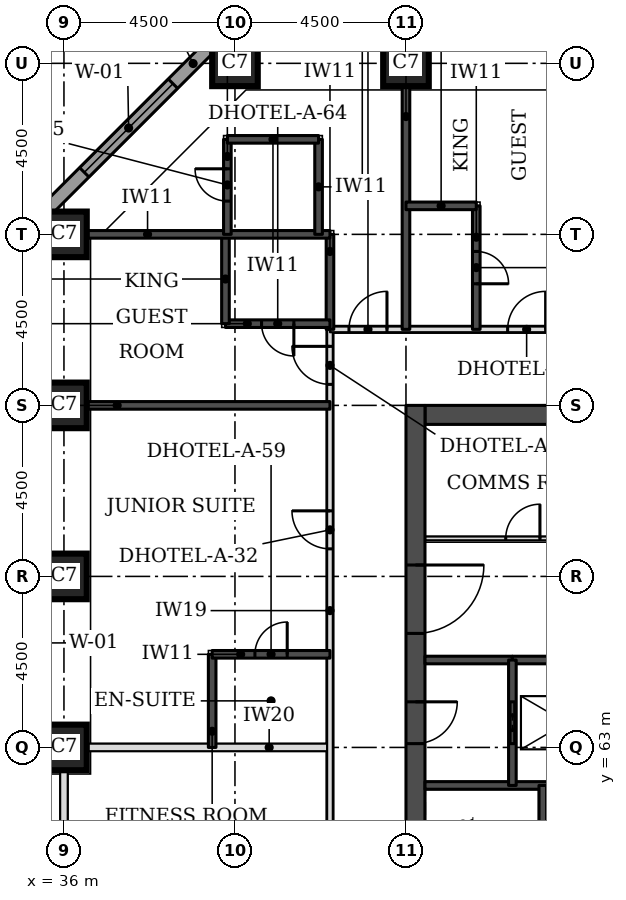
"""IFC4 building model, lengths in metres.
Left out: names, types, materials, properties, quantities, classifications, styles, units other than length and angle.
Written with IfcOpenShell. Run it as: python <this file> out.ifc"""

import sys

from ifc_helpers import new_model, si_unit, direction, frame, frame_2d, origin, origin_2d, place, context, subcontext, project, spatial, rectangle, extrude, element, fill, save


model = new_model("IFC4")
c1 = context("Model", 3, precision=1e-05, world=origin(), true_north=direction((0.0, 1.0)))
c2 = subcontext(c1, "Body", "Model", "MODEL_VIEW")
j1 = project(units=[si_unit("LENGTHUNIT", "METRE"), si_unit("PLANEANGLEUNIT", "RADIAN")], contexts=[c1])
p1 = place(None, origin())
s1 = spatial("IfcSite", under=j1, at=p1, CompositionType="ELEMENT")
p2 = place(p1, origin())
s2 = spatial("IfcBuilding", under=s1, at=p2, CompositionType="ELEMENT")
p3 = place(p2, frame((0.0, 0.0, 26.4)))
s3 = spatial("IfcBuildingStorey", under=s2, at=p3, CompositionType="ELEMENT", Elevation=26.4)
for number, where, z_axis, x_axis in (
    (1, (36.0, 63.0, 0.0), (0.0, 0.0, 1.0), (1.0, 0.0, 0.0)),
    (2, (36.0, 67.5, 0.0), (0.0, 0.0, 1.0), (1.0, 0.0, 0.0)),
    (3, (36.0, 72.0, 0.0), (0.0, 0.0, 1.0), (1.0, 0.0, 0.0)),
    (4, (36.0, 76.5, 0.0), (0.0, 0.0, 1.0), (1.0, 0.0, 0.0)),
    (5, (40.5, 81.0, 0.0), (0.0, 0.0, 1.0), (1.0, 0.0, 0.0)),
    (6, (45.0, 81.0, 0.0), (0.0, 0.0, 1.0), (1.0, 0.0, 0.0)),
):
    element("IfcColumn", number, at=place(p3, frame(where, z_axis=z_axis, x_axis=x_axis)), inside=s3, PredefinedType="COLUMN", context=c2, shape_type="SweptSolid", body=[
        extrude(rectangle(XDim=1.2, YDim=1.2, at=origin_2d()), origin(), (0.0, 0.0, 1.0), 3.3),
    ])
p4 = place(p3, frame((45.5, 71.75, 0.0), z_axis=(0.0, 0.0, 1.0), x_axis=(1.0, 0.0, 0.0)))
e7 = element("IfcWall", 7, at=p4, inside=s3, PredefinedType="SHEAR", context=c2, shape_type="SweptSolid", body=[
    extrude(rectangle(XDim=21.5, YDim=0.5, at=frame_2d((10.75, 0.0))), origin(), (0.0, 0.0, 1.0), 3.3),
])
p5 = place(p3, frame((45.25, 49.5, 0.0), z_axis=(0.0, 0.0, 1.0), x_axis=(0.0, 1.0, 0.0)))
e8 = element("IfcWall", 8, at=p5, inside=s3, PredefinedType="SHEAR", context=c2, shape_type="SweptSolid", body=[
    extrude(rectangle(XDim=22.5, YDim=0.5, at=frame_2d((11.25, 0.0))), origin(), (0.0, 0.0, 1.0), 3.3),
])
p6 = place(p5, frame((4.2, 0.0, 0.0)))
e9 = element("IfcOpeningElement", 9, at=p6, cuts=e8, PredefinedType="OPENING", context=c2, shape_type="SweptSolid", body=[
    extrude(rectangle(XDim=1.8, YDim=2.1, at=frame_2d((0.9, 1.05))), frame((0.0, 0.26, 0.0), z_axis=(0.0, -1.0, 0.0), x_axis=(1.0, 0.0, 0.0)), (0.0, 0.0, 1.0), 0.52),
])
p7 = place(p5, frame((6.9, 0.0, 0.0)))
e10 = element("IfcOpeningElement", 10, at=p7, cuts=e8, PredefinedType="OPENING", context=c2, shape_type="SweptSolid", body=[
    extrude(rectangle(XDim=1.1, YDim=2.1, at=frame_2d((0.55, 1.05))), frame((0.0, 0.26, 0.0), z_axis=(0.0, -1.0, 0.0), x_axis=(1.0, 0.0, 0.0)), (0.0, 0.0, 1.0), 0.52),
])
p8 = place(p5, frame((13.6, 0.0, 0.0)))
e11 = element("IfcOpeningElement", 11, at=p8, cuts=e8, PredefinedType="OPENING", context=c2, shape_type="SweptSolid", body=[
    extrude(rectangle(XDim=1.1, YDim=2.1, at=frame_2d((0.55, 1.05))), frame((0.0, 0.26, 0.0), z_axis=(0.0, -1.0, 0.0), x_axis=(1.0, 0.0, 0.0)), (0.0, 0.0, 1.0), 0.52),
])
p9 = place(p5, frame((16.5, 0.0, 0.0)))
e12 = element("IfcOpeningElement", 12, at=p9, cuts=e8, PredefinedType="OPENING", context=c2, shape_type="SweptSolid", body=[
    extrude(rectangle(XDim=1.8, YDim=2.1, at=frame_2d((0.9, 1.05))), frame((0.0, 0.26, 0.0), z_axis=(0.0, -1.0, 0.0), x_axis=(1.0, 0.0, 0.0)), (0.0, 0.0, 1.0), 0.52),
])
p10 = place(p3, frame((40.23, 81.826, 0.0), z_axis=(0.0, 0.0, 1.0), x_axis=(-0.707106781187, -0.707106781187, 0.0)))
e13 = element("IfcWall", 13, at=p10, inside=s3, PredefinedType="STANDARD", context=c2, shape_type="SweptSolid", body=[
    extrude(rectangle(XDim=7.151, YDim=0.35, at=frame_2d((3.576, 0.0))), origin(), (0.0, 0.0, 1.0), 3.055),
])
p11 = place(p10, frame((1.926, 0.0, 0.8)))
e14 = element("IfcOpeningElement", 14, at=p11, cuts=e13, PredefinedType="OPENING", context=c2, shape_type="SweptSolid", body=[
    extrude(rectangle(XDim=3.3, YDim=1.5, at=frame_2d((1.65, 0.75))), frame((0.0, 0.185, 0.0), z_axis=(0.0, -1.0, 0.0), x_axis=(1.0, 0.0, 0.0)), (0.0, 0.0, 1.0), 0.37),
])
p12 = place(p3, frame((36.0, 56.0, 0.0), z_axis=(0.0, 0.0, 1.0), x_axis=(0.0, 1.0, 0.0)))
e15 = element("IfcWall", 15, at=p12, inside=s3, PredefinedType="PARTITIONING", context=c2, shape_type="SweptSolid", body=[
    extrude(rectangle(XDim=6.4, YDim=0.2, at=frame_2d((3.2, 0.0))), origin(), (0.0, 0.0, 1.0), 2.33),
])
p13 = place(p3, frame((36.6, 63.0, 0.0), z_axis=(0.0, 0.0, 1.0), x_axis=(1.0, 0.0, 0.0)))
e16 = element("IfcWall", 16, at=p13, inside=s3, PredefinedType="PARTITIONING", context=c2, shape_type="SweptSolid", body=[
    extrude(rectangle(XDim=6.4, YDim=0.2, at=frame_2d((3.2, 0.0))), origin(), (0.0, 0.0, 1.0), 3.08),
])
p14 = place(p3, frame((43.0, 56.0, 0.0), z_axis=(0.0, 0.0, 1.0), x_axis=(0.0, 1.0, 0.0)))
e17 = element("IfcWall", 17, at=p14, inside=s3, PredefinedType="PARTITIONING", context=c2, shape_type="SweptSolid", body=[
    extrude(rectangle(XDim=18.0, YDim=0.15, at=frame_2d((9.0, 0.0))), origin(), (0.0, 0.0, 1.0), 3.08),
])
p15 = place(p14, frame((12.225, 0.0, 0.0)))
e18 = element("IfcOpeningElement", 18, at=p15, cuts=e17, PredefinedType="OPENING", context=c2, shape_type="SweptSolid", body=[
    extrude(rectangle(XDim=1.0, YDim=2.1, at=frame_2d((0.5, 1.05))), frame((0.0, 0.085, 0.0), z_axis=(0.0, -1.0, 0.0), x_axis=(1.0, 0.0, 0.0)), (0.0, 0.0, 1.0), 0.17),
])
p16 = place(p14, frame((16.553, 0.0, 0.0)))
e19 = element("IfcOpeningElement", 19, at=p16, cuts=e17, PredefinedType="OPENING", context=c2, shape_type="SweptSolid", body=[
    extrude(rectangle(XDim=1.0, YDim=2.1, at=frame_2d((0.5, 1.05))), frame((0.0, 0.085, 0.0), z_axis=(0.0, -1.0, 0.0), x_axis=(1.0, 0.0, 0.0)), (0.0, 0.0, 1.0), 0.17),
])
p17 = place(p14, frame((3.05, 0.0, 0.0)))
e20 = element("IfcOpeningElement", 20, at=p17, cuts=e17, PredefinedType="OPENING", context=c2, shape_type="SweptSolid", body=[
    extrude(rectangle(XDim=0.9, YDim=2.1, at=frame_2d((0.45, 1.05))), frame((0.0, 0.085, 0.0), z_axis=(0.0, -1.0, 0.0), x_axis=(1.0, 0.0, 0.0)), (0.0, 0.0, 1.0), 0.17),
])
p18 = place(p3, frame((43.0, 74.0, 0.0), z_axis=(0.0, 0.0, 1.0), x_axis=(1.0, 0.0, 0.0)))
e21 = element("IfcWall", 21, at=p18, inside=s3, PredefinedType="PARTITIONING", context=c2, shape_type="SweptSolid", body=[
    extrude(rectangle(XDim=26.5, YDim=0.15, at=frame_2d((13.25, 0.0))), origin(), (0.0, 0.0, 1.0), 3.08),
])
p19 = place(p18, frame((4.675, 0.0, 0.0)))
e22 = element("IfcOpeningElement", 22, at=p19, cuts=e21, PredefinedType="OPENING", context=c2, shape_type="SweptSolid", body=[
    extrude(rectangle(XDim=1.0, YDim=2.1, at=frame_2d((0.5, 1.05))), frame((0.0, 0.085, 0.0), z_axis=(0.0, -1.0, 0.0), x_axis=(1.0, 0.0, 0.0)), (0.0, 0.0, 1.0), 0.17),
])
p20 = place(p18, frame((9.025, 0.0, 0.0)))
e23 = element("IfcOpeningElement", 23, at=p20, cuts=e21, PredefinedType="OPENING", context=c2, shape_type="SweptSolid", body=[
    extrude(rectangle(XDim=1.0, YDim=2.1, at=frame_2d((0.5, 1.05))), frame((0.0, 0.085, 0.0), z_axis=(0.0, -1.0, 0.0), x_axis=(1.0, 0.0, 0.0)), (0.0, 0.0, 1.0), 0.17),
])
p21 = place(p18, frame((20.725, 0.0, 0.0)))
e24 = element("IfcOpeningElement", 24, at=p21, cuts=e21, PredefinedType="OPENING", context=c2, shape_type="SweptSolid", body=[
    extrude(rectangle(XDim=1.0, YDim=2.1, at=frame_2d((0.5, 1.05))), frame((0.0, 0.085, 0.0), z_axis=(0.0, -1.0, 0.0), x_axis=(1.0, 0.0, 0.0)), (0.0, 0.0, 1.0), 0.17),
])
p22 = place(p18, frame((0.5, 0.0, 0.0)))
e25 = element("IfcOpeningElement", 25, at=p22, cuts=e21, PredefinedType="OPENING", context=c2, shape_type="SweptSolid", body=[
    extrude(rectangle(XDim=1.0, YDim=2.1, at=frame_2d((0.5, 1.05))), frame((0.0, 0.085, 0.0), z_axis=(0.0, -1.0, 0.0), x_axis=(1.0, 0.0, 0.0)), (0.0, 0.0, 1.0), 0.17),
])
p23 = place(p18, frame((25.0, 0.0, 0.0)))
e26 = element("IfcOpeningElement", 26, at=p23, cuts=e21, PredefinedType="OPENING", context=c2, shape_type="SweptSolid", body=[
    extrude(rectangle(XDim=1.0, YDim=2.1, at=frame_2d((0.5, 1.05))), frame((0.0, 0.085, 0.0), z_axis=(0.0, -1.0, 0.0), x_axis=(1.0, 0.0, 0.0)), (0.0, 0.0, 1.0), 0.17),
])
p24 = place(p3, frame((39.9, 63.0, 0.0), z_axis=(0.0, 0.0, 1.0), x_axis=(0.0, 1.0, 0.0)))
e27 = element("IfcWall", 27, at=p24, inside=s3, PredefinedType="SOLIDWALL", context=c2, shape_type="SweptSolid", body=[
    extrude(rectangle(XDim=2.45, YDim=0.2, at=frame_2d((1.225, 0.0))), origin(), (0.0, 0.0, 1.0), 3.08),
])
p25 = place(p3, frame((39.9, 65.45, 0.0), z_axis=(0.0, 0.0, 1.0), x_axis=(1.0, 0.0, 0.0)))
e28 = element("IfcWall", 28, at=p25, inside=s3, PredefinedType="SOLIDWALL", context=c2, shape_type="SweptSolid", body=[
    extrude(rectangle(XDim=3.1, YDim=0.2, at=frame_2d((1.55, 0.0))), origin(), (0.0, 0.0, 1.0), 3.08),
])
p26 = place(p25, frame((1.125, 0.0, 0.0)))
e29 = element("IfcOpeningElement", 29, at=p26, cuts=e28, PredefinedType="OPENING", context=c2, shape_type="SweptSolid", body=[
    extrude(rectangle(XDim=0.85, YDim=2.1, at=frame_2d((0.425, 1.05))), frame((0.0, 0.11, 0.0), z_axis=(0.0, -1.0, 0.0), x_axis=(1.0, 0.0, 0.0)), (0.0, 0.0, 1.0), 0.22),
])
p27 = place(p3, frame((36.6, 72.0, 0.0), z_axis=(0.0, 0.0, 1.0), x_axis=(1.0, 0.0, 0.0)))
e30 = element("IfcWall", 30, at=p27, inside=s3, PredefinedType="SOLIDWALL", context=c2, shape_type="SweptSolid", body=[
    extrude(rectangle(XDim=6.4, YDim=0.2, at=frame_2d((3.2, 0.0))), origin(), (0.0, 0.0, 1.0), 3.08),
])
p28 = place(p3, frame((43.0, 74.0, 0.0), z_axis=(0.0, 0.0, 1.0), x_axis=(0.0, 1.0, 0.0)))
e31 = element("IfcWall", 31, at=p28, inside=s3, PredefinedType="SOLIDWALL", context=c2, shape_type="SweptSolid", body=[
    extrude(rectangle(XDim=2.5, YDim=0.2, at=frame_2d((1.25, 0.0))), origin(), (0.0, 0.0, 1.0), 3.08),
])
p29 = place(p3, frame((45.0, 74.0, 0.0), z_axis=(0.0, 0.0, 1.0), x_axis=(0.0, 1.0, 0.0)))
e32 = element("IfcWall", 32, at=p29, inside=s3, PredefinedType="SOLIDWALL", context=c2, shape_type="SweptSolid", body=[
    extrude(rectangle(XDim=6.4, YDim=0.2, at=frame_2d((3.2, 0.0))), origin(), (0.0, 0.0, 1.0), 3.08),
])
p30 = place(p3, frame((46.85, 74.0, 0.0), z_axis=(0.0, 0.0, 1.0), x_axis=(0.0, 1.0, 0.0)))
e33 = element("IfcWall", 33, at=p30, inside=s3, PredefinedType="SOLIDWALL", context=c2, shape_type="SweptSolid", body=[
    extrude(rectangle(XDim=3.25, YDim=0.2, at=frame_2d((1.625, 0.0))), origin(), (0.0, 0.0, 1.0), 3.08),
])
p31 = place(p30, frame((1.2, 0.0, 0.0)))
e34 = element("IfcOpeningElement", 34, at=p31, cuts=e33, PredefinedType="OPENING", context=c2, shape_type="SweptSolid", body=[
    extrude(rectangle(XDim=0.85, YDim=2.1, at=frame_2d((0.425, 1.05))), frame((0.0, 0.11, 0.0), z_axis=(0.0, -1.0, 0.0), x_axis=(1.0, 0.0, 0.0)), (0.0, 0.0, 1.0), 0.22),
])
p32 = place(p3, frame((40.25, 74.15, 0.0), z_axis=(0.0, 0.0, 1.0), x_axis=(1.0, 0.0, 0.0)))
e35 = element("IfcWall", 35, at=p32, inside=s3, PredefinedType="SOLIDWALL", context=c2, shape_type="SweptSolid", body=[
    extrude(rectangle(XDim=2.75, YDim=0.2, at=frame_2d((1.375, 0.0))), origin(), (0.0, 0.0, 1.0), 3.08),
])
p33 = place(p32, frame((0.95, 0.0, 0.0)))
e36 = element("IfcOpeningElement", 36, at=p33, cuts=e35, PredefinedType="OPENING", context=c2, shape_type="SweptSolid", body=[
    extrude(rectangle(XDim=0.85, YDim=2.1, at=frame_2d((0.425, 1.05))), frame((0.0, 0.11, 0.0), z_axis=(0.0, -1.0, 0.0), x_axis=(1.0, 0.0, 0.0)), (0.0, 0.0, 1.0), 0.22),
])
p34 = place(p3, frame((40.25, 74.15, 0.0), z_axis=(0.0, 0.0, 1.0), x_axis=(0.0, 1.0, 0.0)))
e37 = element("IfcWall", 37, at=p34, inside=s3, PredefinedType="SOLIDWALL", context=c2, shape_type="SweptSolid", body=[
    extrude(rectangle(XDim=2.35, YDim=0.2, at=frame_2d((1.175, 0.0))), origin(), (0.0, 0.0, 1.0), 3.08),
])
p35 = place(p3, frame((36.6, 76.5, 0.0), z_axis=(0.0, 0.0, 1.0), x_axis=(1.0, 0.0, 0.0)))
e38 = element("IfcWall", 38, at=p35, inside=s3, PredefinedType="SOLIDWALL", context=c2, shape_type="SweptSolid", body=[
    extrude(rectangle(XDim=6.4, YDim=0.2, at=frame_2d((3.2, 0.0))), origin(), (0.0, 0.0, 1.0), 3.08),
])
p36 = place(p3, frame((40.3, 76.5, 0.0), z_axis=(0.0, 0.0, 1.0), x_axis=(0.0, 1.0, 0.0)))
e39 = element("IfcWall", 39, at=p36, inside=s3, PredefinedType="SOLIDWALL", context=c2, shape_type="SweptSolid", body=[
    extrude(rectangle(XDim=2.5, YDim=0.2, at=frame_2d((1.25, 0.0))), origin(), (0.0, 0.0, 1.0), 3.08),
])
p37 = place(p36, frame((0.875, 0.0, 0.0)))
e40 = element("IfcOpeningElement", 40, at=p37, cuts=e39, PredefinedType="OPENING", context=c2, shape_type="SweptSolid", body=[
    extrude(rectangle(XDim=0.85, YDim=2.1, at=frame_2d((0.425, 1.05))), frame((0.0, 0.11, 0.0), z_axis=(0.0, -1.0, 0.0), x_axis=(1.0, 0.0, 0.0)), (0.0, 0.0, 1.0), 0.22),
])
p38 = place(p3, frame((42.7, 76.5, 0.0), z_axis=(0.0, 0.0, 1.0), x_axis=(0.0, 1.0, 0.0)))
e41 = element("IfcWall", 41, at=p38, inside=s3, PredefinedType="SOLIDWALL", context=c2, shape_type="SweptSolid", body=[
    extrude(rectangle(XDim=2.5, YDim=0.2, at=frame_2d((1.25, 0.0))), origin(), (0.0, 0.0, 1.0), 3.08),
])
p39 = place(p3, frame((45.0, 77.25, 0.0), z_axis=(0.0, 0.0, 1.0), x_axis=(1.0, 0.0, 0.0)))
e42 = element("IfcWall", 42, at=p39, inside=s3, PredefinedType="SOLIDWALL", context=c2, shape_type="SweptSolid", body=[
    extrude(rectangle(XDim=1.85, YDim=0.2, at=frame_2d((0.925, 0.0))), origin(), (0.0, 0.0, 1.0), 3.08),
])
p40 = place(p3, frame((40.3, 79.0, 0.0), z_axis=(0.0, 0.0, 1.0), x_axis=(1.0, 0.0, 0.0)))
e43 = element("IfcWall", 43, at=p40, inside=s3, PredefinedType="SOLIDWALL", context=c2, shape_type="SweptSolid", body=[
    extrude(rectangle(XDim=2.4, YDim=0.2, at=frame_2d((1.2, 0.0))), origin(), (0.0, 0.0, 1.0), 3.08),
])
p41 = place(p3, frame((45.5, 62.0, 0.0), z_axis=(0.0, 0.0, 1.0), x_axis=(1.0, 0.0, 0.0)))
e44 = element("IfcWall", 44, at=p41, inside=s3, PredefinedType="SOLIDWALL", context=c2, shape_type="SweptSolid", body=[
    extrude(rectangle(XDim=5.15, YDim=0.2, at=frame_2d((2.575, 0.0))), origin(), (0.0, 0.0, 1.0), 3.08),
])
p42 = place(p3, frame((45.5, 65.3, 0.0), z_axis=(0.0, 0.0, 1.0), x_axis=(1.0, 0.0, 0.0)))
e45 = element("IfcWall", 45, at=p42, inside=s3, PredefinedType="SOLIDWALL", context=c2, shape_type="SweptSolid", body=[
    extrude(rectangle(XDim=2.3, YDim=0.2, at=frame_2d((1.15, 0.0))), origin(), (0.0, 0.0, 1.0), 3.08),
])
p43 = place(p3, frame((47.8, 65.3, 0.0), z_axis=(0.0, 0.0, 1.0), x_axis=(1.0, 0.0, 0.0)))
e46 = element("IfcWall", 46, at=p43, inside=s3, PredefinedType="SOLIDWALL", context=c2, shape_type="SweptSolid", body=[
    extrude(rectangle(XDim=16.9, YDim=0.2, at=frame_2d((8.45, 0.0))), origin(), (0.0, 0.0, 1.0), 3.08),
])
p44 = place(p3, frame((45.5, 68.5, 0.0), z_axis=(0.0, 0.0, 1.0), x_axis=(1.0, 0.0, 0.0)))
e47 = element("IfcWall", 47, at=p44, inside=s3, PredefinedType="PARTITIONING", context=c2, shape_type="SweptSolid", body=[
    extrude(rectangle(XDim=5.15, YDim=0.1, at=frame_2d((2.575, 0.0))), origin(), (0.0, 0.0, 1.0), 3.08),
])
p45 = place(p44, frame((2.125, 0.0, 0.0)))
e48 = element("IfcOpeningElement", 48, at=p45, cuts=e47, PredefinedType="OPENING", context=c2, shape_type="SweptSolid", body=[
    extrude(rectangle(XDim=0.9, YDim=2.1, at=frame_2d((0.45, 1.05))), frame((0.0, 0.06, 0.0), z_axis=(0.0, -1.0, 0.0), x_axis=(1.0, 0.0, 0.0)), (0.0, 0.0, 1.0), 0.12),
])
p46 = place(p3, frame((47.8, 62.0, 0.0), z_axis=(0.0, 0.0, 1.0), x_axis=(0.0, 1.0, 0.0)))
e49 = element("IfcWall", 49, at=p46, inside=s3, PredefinedType="SOLIDWALL", context=c2, shape_type="SweptSolid", body=[
    extrude(rectangle(XDim=3.3, YDim=0.2, at=frame_2d((1.65, 0.0))), origin(), (0.0, 0.0, 1.0), 3.08),
])
p47 = place(p46, frame((1.1, 0.0, 0.0)))
e50 = element("IfcOpeningElement", 50, at=p47, cuts=e49, PredefinedType="OPENING", context=c2, shape_type="SweptSolid", body=[
    extrude(rectangle(XDim=1.1, YDim=2.1, at=frame_2d((0.55, 1.05))), frame((0.0, 0.11, 0.0), z_axis=(0.0, -1.0, 0.0), x_axis=(1.0, 0.0, 0.0)), (0.0, 0.0, 1.0), 0.22),
])
p48 = place(p3, frame((48.6, 56.2, 0.0), z_axis=(0.0, 0.0, 1.0), x_axis=(0.0, 1.0, 0.0)))
e51 = element("IfcWall", 51, at=p48, inside=s3, PredefinedType="SOLIDWALL", context=c2, shape_type="SweptSolid", body=[
    extrude(rectangle(XDim=5.8, YDim=0.2, at=frame_2d((2.9, 0.0))), origin(), (0.0, 0.0, 1.0), 3.08),
])
p49 = place(p11, origin())
e52 = element("IfcWindow", 52, at=p49, inside=s3, PartitioningType="SINGLE_PANEL", PredefinedType="WINDOW", context=c2, shape_type="SweptSolid", body=[
    extrude(rectangle(XDim=3.3, YDim=1.5, at=frame_2d((1.65, 0.75))), frame((0.0, 0.085, 0.0), z_axis=(0.0, -1.0, 0.0), x_axis=(1.0, 0.0, 0.0)), (0.0, 0.0, 1.0), 0.06),
])
fill(e14, e52)
p50 = place(p15, origin())
e53 = element("IfcDoor", 53, at=p50, inside=s3, OperationType="SINGLE_SWING_RIGHT", PredefinedType="DOOR", context=c2, shape_type="SweptSolid", body=[
    extrude(rectangle(XDim=1.0, YDim=2.1, at=frame_2d((0.5, 1.05))), frame((0.0, 0.025, 0.0), z_axis=(0.0, -1.0, 0.0), x_axis=(1.0, 0.0, 0.0)), (0.0, 0.0, 1.0), 0.05),
])
fill(e18, e53)
p51 = place(p26, origin())
e54 = element("IfcDoor", 54, at=p51, inside=s3, OperationType="SINGLE_SWING_RIGHT", PredefinedType="DOOR", context=c2, shape_type="SweptSolid", body=[
    extrude(rectangle(XDim=0.85, YDim=2.1, at=frame_2d((0.425, 1.05))), frame((0.0, 0.025, 0.0), z_axis=(0.0, -1.0, 0.0), x_axis=(1.0, 0.0, 0.0)), (0.0, 0.0, 1.0), 0.05),
])
fill(e29, e54)
p52 = place(p16, origin())
e55 = element("IfcDoor", 55, at=p52, inside=s3, OperationType="SINGLE_SWING_RIGHT", PredefinedType="DOOR", context=c2, shape_type="SweptSolid", body=[
    extrude(rectangle(XDim=1.0, YDim=2.1, at=frame_2d((0.5, 1.05))), frame((0.0, 0.025, 0.0), z_axis=(0.0, -1.0, 0.0), x_axis=(1.0, 0.0, 0.0)), (0.0, 0.0, 1.0), 0.05),
])
fill(e19, e55)
p53 = place(p33, frame((0.85, 0.0, 0.0), z_axis=(0.0, 0.0, 1.0), x_axis=(-1.0, 0.0, 0.0)))
e56 = element("IfcDoor", 56, at=p53, inside=s3, OperationType="SINGLE_SWING_LEFT", PredefinedType="DOOR", context=c2, shape_type="SweptSolid", body=[
    extrude(rectangle(XDim=0.85, YDim=2.1, at=frame_2d((0.425, 1.05))), frame((0.0, 0.025, 0.0), z_axis=(0.0, -1.0, 0.0), x_axis=(1.0, 0.0, 0.0)), (0.0, 0.0, 1.0), 0.05),
])
fill(e36, e56)
p54 = place(p19, origin())
e57 = element("IfcDoor", 57, at=p54, inside=s3, OperationType="SINGLE_SWING_RIGHT", PredefinedType="DOOR", context=c2, shape_type="SweptSolid", body=[
    extrude(rectangle(XDim=1.0, YDim=2.1, at=frame_2d((0.5, 1.05))), frame((0.0, 0.025, 0.0), z_axis=(0.0, -1.0, 0.0), x_axis=(1.0, 0.0, 0.0)), (0.0, 0.0, 1.0), 0.05),
])
fill(e22, e57)
p55 = place(p31, frame((0.85, 0.0, 0.0), z_axis=(0.0, 0.0, 1.0), x_axis=(-1.0, 0.0, 0.0)))
e58 = element("IfcDoor", 58, at=p55, inside=s3, OperationType="SINGLE_SWING_RIGHT", PredefinedType="DOOR", context=c2, shape_type="SweptSolid", body=[
    extrude(rectangle(XDim=0.85, YDim=2.1, at=frame_2d((0.425, 1.05))), frame((0.0, 0.025, 0.0), z_axis=(0.0, -1.0, 0.0), x_axis=(1.0, 0.0, 0.0)), (0.0, 0.0, 1.0), 0.05),
])
fill(e34, e58)
p56 = place(p22, origin())
e59 = element("IfcDoor", 59, at=p56, inside=s3, OperationType="SINGLE_SWING_RIGHT", PredefinedType="DOOR", context=c2, shape_type="SweptSolid", body=[
    extrude(rectangle(XDim=1.0, YDim=2.1, at=frame_2d((0.5, 1.05))), frame((0.0, 0.025, 0.0), z_axis=(0.0, -1.0, 0.0), x_axis=(1.0, 0.0, 0.0)), (0.0, 0.0, 1.0), 0.05),
])
fill(e25, e59)
p57 = place(p37, origin())
e60 = element("IfcDoor", 60, at=p57, inside=s3, OperationType="SINGLE_SWING_RIGHT", PredefinedType="DOOR", context=c2, shape_type="SweptSolid", body=[
    extrude(rectangle(XDim=0.85, YDim=2.1, at=frame_2d((0.425, 1.05))), frame((0.0, 0.025, 0.0), z_axis=(0.0, -1.0, 0.0), x_axis=(1.0, 0.0, 0.0)), (0.0, 0.0, 1.0), 0.05),
])
fill(e40, e60)
p58 = place(p47, origin())
e61 = element("IfcDoor", 61, at=p58, inside=s3, OperationType="DOUBLE_DOOR_SLIDING", PredefinedType="DOOR", context=c2, shape_type="SweptSolid", body=[
    extrude(rectangle(XDim=1.1, YDim=2.1, at=frame_2d((0.55, 1.05))), frame((0.0, 0.025, 0.0), z_axis=(0.0, -1.0, 0.0), x_axis=(1.0, 0.0, 0.0)), (0.0, 0.0, 1.0), 0.05),
])
fill(e50, e61)
p59 = place(p8, frame((1.1, 0.0, 0.0), z_axis=(0.0, 0.0, 1.0), x_axis=(-1.0, 0.0, 0.0)))
e62 = element("IfcDoor", 62, at=p59, inside=s3, OperationType="SINGLE_SWING_LEFT", PredefinedType="DOOR", context=c2, shape_type="SweptSolid", body=[
    extrude(rectangle(XDim=1.1, YDim=2.1, at=frame_2d((0.55, 1.05))), frame((0.0, 0.025, 0.0), z_axis=(0.0, -1.0, 0.0), x_axis=(1.0, 0.0, 0.0)), (0.0, 0.0, 1.0), 0.05),
])
fill(e11, e62)
p60 = place(p9, frame((1.8, 0.0, 0.0), z_axis=(0.0, 0.0, 1.0), x_axis=(-1.0, 0.0, 0.0)))
e63 = element("IfcDoor", 63, at=p60, inside=s3, OperationType="SINGLE_SWING_LEFT", PredefinedType="DOOR", context=c2, shape_type="SweptSolid", body=[
    extrude(rectangle(XDim=1.8, YDim=2.1, at=frame_2d((0.9, 1.05))), frame((0.0, 0.025, 0.0), z_axis=(0.0, -1.0, 0.0), x_axis=(1.0, 0.0, 0.0)), (0.0, 0.0, 1.0), 0.05),
])
fill(e12, e63)
p61 = place(p45, origin())
e64 = element("IfcDoor", 64, at=p61, inside=s3, OperationType="SINGLE_SWING_RIGHT", PredefinedType="DOOR", context=c2, shape_type="SweptSolid", body=[
    extrude(rectangle(XDim=0.9, YDim=2.1, at=frame_2d((0.45, 1.05))), frame((0.0, 0.025, 0.0), z_axis=(0.0, -1.0, 0.0), x_axis=(1.0, 0.0, 0.0)), (0.0, 0.0, 1.0), 0.05),
])
fill(e48, e64)
save(model, sys.argv[1])
